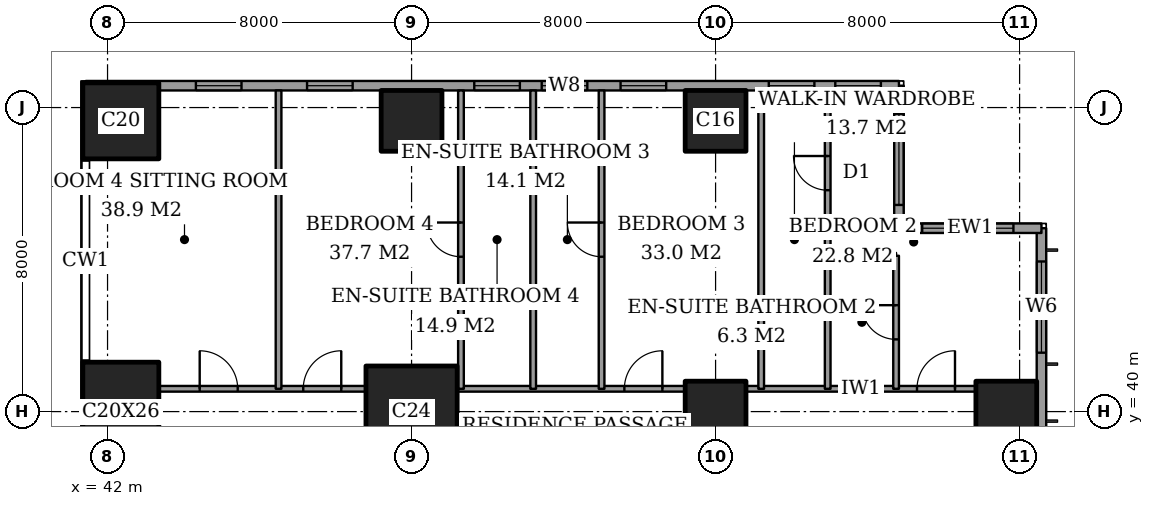
"""IFC4 building model, lengths in metres.
Left out: names, types, materials, properties, quantities, classifications, styles, units other than length and angle.
Written with IfcOpenShell. Run it as: python <this file> out.ifc"""

import sys

from ifc_helpers import new_model, si_unit, direction, frame, frame_2d, origin, origin_2d, place, context, subcontext, project, spatial, rectangle, extrude, element, fill, save


model = new_model("IFC4")
c1 = context("Model", 3, precision=1e-05, world=origin(), true_north=direction((0.0, 1.0)))
c2 = subcontext(c1, "Body", "Model", "MODEL_VIEW")
j1 = project(units=[si_unit("LENGTHUNIT", "METRE"), si_unit("PLANEANGLEUNIT", "RADIAN")], contexts=[c1])
p1 = place(None, origin())
s1 = spatial("IfcSite", under=j1, at=p1, CompositionType="ELEMENT")
p2 = place(p1, origin())
s2 = spatial("IfcBuilding", under=s1, at=p2, CompositionType="ELEMENT")
p3 = place(p2, frame((0.0, 0.0, 270.0)))
s3 = spatial("IfcBuildingStorey", under=s2, at=p3, CompositionType="ELEMENT", Elevation=270.0)
p4 = place(p3, frame((42.35, 40.0, 0.0), z_axis=(0.0, 0.0, 1.0), x_axis=(1.0, 0.0, 0.0)))
e1 = element("IfcColumn", 1, at=p4, inside=s3, PredefinedType="COLUMN", context=c2, shape_type="SweptSolid", body=[
    extrude(rectangle(XDim=2.0, YDim=2.6, at=origin_2d()), origin(), (0.0, 0.0, 1.0), 3.6),
])
p5 = place(p3, frame((42.35, 47.65, 0.0), z_axis=(0.0, 0.0, 1.0), x_axis=(1.0, 0.0, 0.0)))
e2 = element("IfcColumn", 2, at=p5, inside=s3, PredefinedType="COLUMN", context=c2, shape_type="SweptSolid", body=[
    extrude(rectangle(XDim=2.0, YDim=2.0, at=origin_2d()), origin(), (0.0, 0.0, 1.0), 3.6),
])
p6 = place(p3, frame((50.0, 40.0, 0.0), z_axis=(0.0, 0.0, 1.0), x_axis=(1.0, 0.0, 0.0)))
e3 = element("IfcColumn", 3, at=p6, inside=s3, PredefinedType="COLUMN", context=c2, shape_type="SweptSolid", body=[
    extrude(rectangle(XDim=2.4, YDim=2.4, at=origin_2d()), origin(), (0.0, 0.0, 1.0), 3.6),
])
for number, where, z_axis, x_axis in (
    (4, (50.0, 47.65, 0.0), (0.0, 0.0, 1.0), (1.0, 0.0, 0.0)),
    (5, (58.0, 40.0, 0.0), (0.0, 0.0, 1.0), (1.0, 0.0, 0.0)),
    (6, (58.0, 47.65, 0.0), (0.0, 0.0, 1.0), (1.0, 0.0, 0.0)),
    (7, (65.65, 40.0, 0.0), (0.0, 0.0, 1.0), (1.0, 0.0, 0.0)),
):
    element("IfcColumn", number, at=place(p3, frame(where, z_axis=z_axis, x_axis=x_axis)), inside=s3, PredefinedType="COLUMN", context=c2, shape_type="SweptSolid", body=[
        extrude(rectangle(XDim=1.6, YDim=1.6, at=origin_2d()), origin(), (0.0, 0.0, 1.0), 3.6),
    ])
p7 = place(p3, frame((66.575, 3.175, 0.0), z_axis=(0.0, 0.0, 1.0), x_axis=(0.0, 1.0, 0.0)))
e8 = element("IfcWall", 8, at=p7, inside=s3, PredefinedType="SOLIDWALL", context=c2, shape_type="SweptSolid", body=[
    extrude(rectangle(XDim=41.65, YDim=0.25, at=frame_2d((20.825, 0.0))), origin(), (0.0, 0.0, 1.0), 3.6),
])
p8 = place(p7, frame((0.875, 0.0, 0.6)))
e9 = element("IfcOpeningElement", 9, at=p8, cuts=e8, PredefinedType="OPENING", context=c2, shape_type="SweptSolid", body=[
    extrude(rectangle(XDim=2.4, YDim=2.0, at=frame_2d((1.2, 1.0))), frame((0.0, 0.135, 0.0), z_axis=(0.0, -1.0, 0.0), x_axis=(1.0, 0.0, 0.0)), (0.0, 0.0, 1.0), 0.27),
])
p9 = place(p7, frame((6.0, 0.0, 0.6)))
e10 = element("IfcOpeningElement", 10, at=p9, cuts=e8, PredefinedType="OPENING", context=c2, shape_type="SweptSolid", body=[
    extrude(rectangle(XDim=1.2, YDim=2.0, at=frame_2d((0.6, 1.0))), frame((0.0, 0.135, 0.0), z_axis=(0.0, -1.0, 0.0), x_axis=(1.0, 0.0, 0.0)), (0.0, 0.0, 1.0), 0.27),
])
p10 = place(p7, frame((8.525, 0.0, 0.6)))
e11 = element("IfcOpeningElement", 11, at=p10, cuts=e8, PredefinedType="OPENING", context=c2, shape_type="SweptSolid", body=[
    extrude(rectangle(XDim=2.4, YDim=2.0, at=frame_2d((1.2, 1.0))), frame((0.0, 0.135, 0.0), z_axis=(0.0, -1.0, 0.0), x_axis=(1.0, 0.0, 0.0)), (0.0, 0.0, 1.0), 0.27),
])
p11 = place(p7, frame((15.725, 0.0, 0.6)))
e12 = element("IfcOpeningElement", 12, at=p11, cuts=e8, PredefinedType="OPENING", context=c2, shape_type="SweptSolid", body=[
    extrude(rectangle(XDim=2.4, YDim=2.0, at=frame_2d((1.2, 1.0))), frame((0.0, 0.135, 0.0), z_axis=(0.0, -1.0, 0.0), x_axis=(1.0, 0.0, 0.0)), (0.0, 0.0, 1.0), 0.27),
])
p12 = place(p7, frame((23.625, 0.0, 0.6)))
e13 = element("IfcOpeningElement", 13, at=p12, cuts=e8, PredefinedType="OPENING", context=c2, shape_type="SweptSolid", body=[
    extrude(rectangle(XDim=2.4, YDim=2.0, at=frame_2d((1.2, 1.0))), frame((0.0, 0.135, 0.0), z_axis=(0.0, -1.0, 0.0), x_axis=(1.0, 0.0, 0.0)), (0.0, 0.0, 1.0), 0.27),
])
p13 = place(p7, frame((30.725, 0.0, 0.6)))
e14 = element("IfcOpeningElement", 14, at=p13, cuts=e8, PredefinedType="OPENING", context=c2, shape_type="SweptSolid", body=[
    extrude(rectangle(XDim=2.4, YDim=2.0, at=frame_2d((1.2, 1.0))), frame((0.0, 0.135, 0.0), z_axis=(0.0, -1.0, 0.0), x_axis=(1.0, 0.0, 0.0)), (0.0, 0.0, 1.0), 0.27),
])
p14 = place(p7, frame((34.525, 0.0, 0.6)))
e15 = element("IfcOpeningElement", 15, at=p14, cuts=e8, PredefinedType="OPENING", context=c2, shape_type="SweptSolid", body=[
    extrude(rectangle(XDim=1.2, YDim=2.0, at=frame_2d((0.6, 1.0))), frame((0.0, 0.135, 0.0), z_axis=(0.0, -1.0, 0.0), x_axis=(1.0, 0.0, 0.0)), (0.0, 0.0, 1.0), 0.27),
])
p15 = place(p7, frame((38.375, 0.0, 0.6)))
e16 = element("IfcOpeningElement", 16, at=p15, cuts=e8, PredefinedType="OPENING", context=c2, shape_type="SweptSolid", body=[
    extrude(rectangle(XDim=2.4, YDim=2.0, at=frame_2d((1.2, 1.0))), frame((0.0, 0.135, 0.0), z_axis=(0.0, -1.0, 0.0), x_axis=(1.0, 0.0, 0.0)), (0.0, 0.0, 1.0), 0.27),
])
p16 = place(p3, frame((66.575, 44.825, 0.0), z_axis=(0.0, 0.0, 1.0), x_axis=(-1.0, 0.0, 0.0)))
e17 = element("IfcWall", 17, at=p16, inside=s3, PredefinedType="SOLIDWALL", context=c2, shape_type="SweptSolid", body=[
    extrude(rectangle(XDim=3.75, YDim=0.25, at=frame_2d((1.875, 0.0))), origin(), (0.0, 0.0, 1.0), 3.6),
])
p17 = place(p16, frame((0.738, 0.0, 0.6)))
e18 = element("IfcOpeningElement", 18, at=p17, cuts=e17, PredefinedType="OPENING", context=c2, shape_type="SweptSolid", body=[
    extrude(rectangle(XDim=2.4, YDim=2.0, at=frame_2d((1.2, 1.0))), frame((0.0, 0.135, 0.0), z_axis=(0.0, -1.0, 0.0), x_axis=(1.0, 0.0, 0.0)), (0.0, 0.0, 1.0), 0.27),
])
p18 = place(p3, frame((62.825, 44.825, 0.0), z_axis=(0.0, 0.0, 1.0), x_axis=(0.0, 1.0, 0.0)))
e19 = element("IfcWall", 19, at=p18, inside=s3, PredefinedType="SOLIDWALL", context=c2, shape_type="SweptSolid", body=[
    extrude(rectangle(XDim=3.75, YDim=0.25, at=frame_2d((1.875, 0.0))), origin(), (0.0, 0.0, 1.0), 3.6),
])
p19 = place(p18, frame((0.613, 0.0, 0.6)))
e20 = element("IfcOpeningElement", 20, at=p19, cuts=e19, PredefinedType="OPENING", context=c2, shape_type="SweptSolid", body=[
    extrude(rectangle(XDim=2.4, YDim=2.0, at=frame_2d((1.2, 1.0))), frame((0.0, 0.135, 0.0), z_axis=(0.0, -1.0, 0.0), x_axis=(1.0, 0.0, 0.0)), (0.0, 0.0, 1.0), 0.27),
])
p20 = place(p3, frame((62.825, 48.575, 0.0), z_axis=(0.0, 0.0, 1.0), x_axis=(-1.0, 0.0, 0.0)))
e21 = element("IfcWall", 21, at=p20, inside=s3, PredefinedType="SOLIDWALL", context=c2, shape_type="SweptSolid", body=[
    extrude(rectangle(XDim=21.4, YDim=0.25, at=frame_2d((10.7, 0.0))), origin(), (0.0, 0.0, 1.0), 3.6),
])
p21 = place(p20, frame((0.475, 0.0, 0.6)))
e22 = element("IfcOpeningElement", 22, at=p21, cuts=e21, PredefinedType="OPENING", context=c2, shape_type="SweptSolid", body=[
    extrude(rectangle(XDim=1.2, YDim=2.0, at=frame_2d((0.6, 1.0))), frame((0.0, 0.135, 0.0), z_axis=(0.0, -1.0, 0.0), x_axis=(1.0, 0.0, 0.0)), (0.0, 0.0, 1.0), 0.27),
])
p22 = place(p20, frame((2.225, 0.0, 0.6)))
e23 = element("IfcOpeningElement", 23, at=p22, cuts=e21, PredefinedType="OPENING", context=c2, shape_type="SweptSolid", body=[
    extrude(rectangle(XDim=1.2, YDim=2.0, at=frame_2d((0.6, 1.0))), frame((0.0, 0.135, 0.0), z_axis=(0.0, -1.0, 0.0), x_axis=(1.0, 0.0, 0.0)), (0.0, 0.0, 1.0), 0.27),
])
p23 = place(p20, frame((6.125, 0.0, 0.6)))
e24 = element("IfcOpeningElement", 24, at=p23, cuts=e21, PredefinedType="OPENING", context=c2, shape_type="SweptSolid", body=[
    extrude(rectangle(XDim=1.2, YDim=2.0, at=frame_2d((0.6, 1.0))), frame((0.0, 0.135, 0.0), z_axis=(0.0, -1.0, 0.0), x_axis=(1.0, 0.0, 0.0)), (0.0, 0.0, 1.0), 0.27),
])
p24 = place(p20, frame((8.2, 0.0, 0.6)))
e25 = element("IfcOpeningElement", 25, at=p24, cuts=e21, PredefinedType="OPENING", context=c2, shape_type="SweptSolid", body=[
    extrude(rectangle(XDim=1.2, YDim=2.0, at=frame_2d((0.6, 1.0))), frame((0.0, 0.135, 0.0), z_axis=(0.0, -1.0, 0.0), x_axis=(1.0, 0.0, 0.0)), (0.0, 0.0, 1.0), 0.27),
])
p25 = place(p20, frame((9.975, 0.0, 0.6)))
e26 = element("IfcOpeningElement", 26, at=p25, cuts=e21, PredefinedType="OPENING", context=c2, shape_type="SweptSolid", body=[
    extrude(rectangle(XDim=1.2, YDim=2.0, at=frame_2d((0.6, 1.0))), frame((0.0, 0.135, 0.0), z_axis=(0.0, -1.0, 0.0), x_axis=(1.0, 0.0, 0.0)), (0.0, 0.0, 1.0), 0.27),
])
p26 = place(p20, frame((14.375, 0.0, 0.6)))
e27 = element("IfcOpeningElement", 27, at=p26, cuts=e21, PredefinedType="OPENING", context=c2, shape_type="SweptSolid", body=[
    extrude(rectangle(XDim=1.2, YDim=2.0, at=frame_2d((0.6, 1.0))), frame((0.0, 0.135, 0.0), z_axis=(0.0, -1.0, 0.0), x_axis=(1.0, 0.0, 0.0)), (0.0, 0.0, 1.0), 0.27),
])
p27 = place(p20, frame((17.3, 0.0, 0.6)))
e28 = element("IfcOpeningElement", 28, at=p27, cuts=e21, PredefinedType="OPENING", context=c2, shape_type="SweptSolid", body=[
    extrude(rectangle(XDim=1.2, YDim=2.0, at=frame_2d((0.6, 1.0))), frame((0.0, 0.135, 0.0), z_axis=(0.0, -1.0, 0.0), x_axis=(1.0, 0.0, 0.0)), (0.0, 0.0, 1.0), 0.27),
])
p28 = place(p3, frame((43.35, 40.6, 0.0), z_axis=(0.0, 0.0, 1.0), x_axis=(1.0, 0.0, 0.0)))
e29 = element("IfcWall", 29, at=p28, inside=s3, PredefinedType="PARTITIONING", context=c2, shape_type="SweptSolid", body=[
    extrude(rectangle(XDim=5.45, YDim=0.15, at=frame_2d((2.725, 0.0))), origin(), (0.0, 0.0, 1.0), 3.35),
])
p29 = place(p28, frame((3.8, 0.0, 0.0)))
e30 = element("IfcOpeningElement", 30, at=p29, cuts=e29, PredefinedType="OPENING", context=c2, shape_type="SweptSolid", body=[
    extrude(rectangle(XDim=1.0, YDim=2.1, at=frame_2d((0.5, 1.05))), frame((0.0, 0.085, 0.0), z_axis=(0.0, -1.0, 0.0), x_axis=(1.0, 0.0, 0.0)), (0.0, 0.0, 1.0), 0.17),
])
p30 = place(p28, frame((1.075, 0.0, 0.0)))
e31 = element("IfcOpeningElement", 31, at=p30, cuts=e29, PredefinedType="OPENING", context=c2, shape_type="SweptSolid", body=[
    extrude(rectangle(XDim=1.0, YDim=2.1, at=frame_2d((0.5, 1.05))), frame((0.0, 0.085, 0.0), z_axis=(0.0, -1.0, 0.0), x_axis=(1.0, 0.0, 0.0)), (0.0, 0.0, 1.0), 0.17),
])
p31 = place(p3, frame((51.2, 40.6, 0.0), z_axis=(0.0, 0.0, 1.0), x_axis=(1.0, 0.0, 0.0)))
e32 = element("IfcWall", 32, at=p31, inside=s3, PredefinedType="PARTITIONING", context=c2, shape_type="SweptSolid", body=[
    extrude(rectangle(XDim=6.0, YDim=0.15, at=frame_2d((3.0, 0.0))), origin(), (0.0, 0.0, 1.0), 3.35),
])
p32 = place(p31, frame((4.4, 0.0, 0.0)))
e33 = element("IfcOpeningElement", 33, at=p32, cuts=e32, PredefinedType="OPENING", context=c2, shape_type="SweptSolid", body=[
    extrude(rectangle(XDim=1.0, YDim=2.1, at=frame_2d((0.5, 1.05))), frame((0.0, 0.085, 0.0), z_axis=(0.0, -1.0, 0.0), x_axis=(1.0, 0.0, 0.0)), (0.0, 0.0, 1.0), 0.17),
])
p33 = place(p3, frame((58.8, 40.6, 0.0), z_axis=(0.0, 0.0, 1.0), x_axis=(1.0, 0.0, 0.0)))
e34 = element("IfcWall", 34, at=p33, inside=s3, PredefinedType="PARTITIONING", context=c2, shape_type="SweptSolid", body=[
    extrude(rectangle(XDim=6.05, YDim=0.15, at=frame_2d((3.025, 0.0))), origin(), (0.0, 0.0, 1.0), 3.35),
])
p34 = place(p33, frame((4.5, 0.0, 0.0)))
e35 = element("IfcOpeningElement", 35, at=p34, cuts=e34, PredefinedType="OPENING", context=c2, shape_type="SweptSolid", body=[
    extrude(rectangle(XDim=1.0, YDim=2.1, at=frame_2d((0.5, 1.05))), frame((0.0, 0.085, 0.0), z_axis=(0.0, -1.0, 0.0), x_axis=(1.0, 0.0, 0.0)), (0.0, 0.0, 1.0), 0.17),
])
p35 = place(p3, frame((60.95, 44.1, 0.0), z_axis=(0.0, 0.0, 1.0), x_axis=(1.0, 0.0, 0.0)))
e36 = element("IfcWall", 36, at=p35, inside=s3, PredefinedType="PARTITIONING", context=c2, shape_type="SweptSolid", body=[
    extrude(rectangle(XDim=1.8, YDim=0.15, at=frame_2d((0.9, 0.0))), origin(), (0.0, 0.0, 1.0), 3.35),
])
p36 = place(p3, frame((46.5, 40.6, 0.0), z_axis=(0.0, 0.0, 1.0), x_axis=(0.0, 1.0, 0.0)))
e37 = element("IfcWall", 37, at=p36, inside=s3, PredefinedType="PARTITIONING", context=c2, shape_type="SweptSolid", body=[
    extrude(rectangle(XDim=7.85, YDim=0.15, at=frame_2d((3.925, 0.0))), origin(), (0.0, 0.0, 1.0), 3.35),
])
p37 = place(p3, frame((51.3, 40.6, 0.0), z_axis=(0.0, 0.0, 1.0), x_axis=(0.0, 1.0, 0.0)))
e38 = element("IfcWall", 38, at=p37, inside=s3, PredefinedType="PARTITIONING", context=c2, shape_type="SweptSolid", body=[
    extrude(rectangle(XDim=7.85, YDim=0.15, at=frame_2d((3.925, 0.0))), origin(), (0.0, 0.0, 1.0), 3.35),
])
p38 = place(p37, frame((3.475, 0.0, 0.0)))
e39 = element("IfcOpeningElement", 39, at=p38, cuts=e38, PredefinedType="OPENING", context=c2, shape_type="SweptSolid", body=[
    extrude(rectangle(XDim=0.9, YDim=2.1, at=frame_2d((0.45, 1.05))), frame((0.0, 0.085, 0.0), z_axis=(0.0, -1.0, 0.0), x_axis=(1.0, 0.0, 0.0)), (0.0, 0.0, 1.0), 0.17),
])
p39 = place(p3, frame((53.2, 40.6, 0.0), z_axis=(0.0, 0.0, 1.0), x_axis=(0.0, 1.0, 0.0)))
e40 = element("IfcWall", 40, at=p39, inside=s3, PredefinedType="PARTITIONING", context=c2, shape_type="SweptSolid", body=[
    extrude(rectangle(XDim=7.85, YDim=0.15, at=frame_2d((3.925, 0.0))), origin(), (0.0, 0.0, 1.0), 3.35),
])
p40 = place(p3, frame((55.0, 40.6, 0.0), z_axis=(0.0, 0.0, 1.0), x_axis=(0.0, 1.0, 0.0)))
e41 = element("IfcWall", 41, at=p40, inside=s3, PredefinedType="PARTITIONING", context=c2, shape_type="SweptSolid", body=[
    extrude(rectangle(XDim=7.85, YDim=0.15, at=frame_2d((3.925, 0.0))), origin(), (0.0, 0.0, 1.0), 3.35),
])
p41 = place(p40, frame((3.475, 0.0, 0.0)))
e42 = element("IfcOpeningElement", 42, at=p41, cuts=e41, PredefinedType="OPENING", context=c2, shape_type="SweptSolid", body=[
    extrude(rectangle(XDim=0.9, YDim=2.1, at=frame_2d((0.45, 1.05))), frame((0.0, 0.085, 0.0), z_axis=(0.0, -1.0, 0.0), x_axis=(1.0, 0.0, 0.0)), (0.0, 0.0, 1.0), 0.17),
])
p42 = place(p3, frame((59.2, 40.6, 0.0), z_axis=(0.0, 0.0, 1.0), x_axis=(0.0, 1.0, 0.0)))
e43 = element("IfcWall", 43, at=p42, inside=s3, PredefinedType="PARTITIONING", context=c2, shape_type="SweptSolid", body=[
    extrude(rectangle(XDim=7.85, YDim=0.15, at=frame_2d((3.925, 0.0))), origin(), (0.0, 0.0, 1.0), 3.35),
])
p43 = place(p3, frame((60.95, 40.6, 0.0), z_axis=(0.0, 0.0, 1.0), x_axis=(0.0, 1.0, 0.0)))
e44 = element("IfcWall", 44, at=p43, inside=s3, PredefinedType="PARTITIONING", context=c2, shape_type="SweptSolid", body=[
    extrude(rectangle(XDim=7.85, YDim=0.15, at=frame_2d((3.925, 0.0))), origin(), (0.0, 0.0, 1.0), 3.35),
])
p44 = place(p43, frame((5.225, 0.0, 0.0)))
e45 = element("IfcOpeningElement", 45, at=p44, cuts=e44, PredefinedType="OPENING", context=c2, shape_type="SweptSolid", body=[
    extrude(rectangle(XDim=0.9, YDim=2.1, at=frame_2d((0.45, 1.05))), frame((0.0, 0.085, 0.0), z_axis=(0.0, -1.0, 0.0), x_axis=(1.0, 0.0, 0.0)), (0.0, 0.0, 1.0), 0.17),
])
p45 = place(p3, frame((62.75, 40.6, 0.0), z_axis=(0.0, 0.0, 1.0), x_axis=(0.0, 1.0, 0.0)))
e46 = element("IfcWall", 46, at=p45, inside=s3, PredefinedType="PARTITIONING", context=c2, shape_type="SweptSolid", body=[
    extrude(rectangle(XDim=3.5, YDim=0.15, at=frame_2d((1.75, 0.0))), origin(), (0.0, 0.0, 1.0), 3.35),
])
p46 = place(p45, frame((1.3, 0.0, 0.0)))
e47 = element("IfcOpeningElement", 47, at=p46, cuts=e46, PredefinedType="OPENING", context=c2, shape_type="SweptSolid", body=[
    extrude(rectangle(XDim=0.9, YDim=2.1, at=frame_2d((0.45, 1.05))), frame((0.0, 0.085, 0.0), z_axis=(0.0, -1.0, 0.0), x_axis=(1.0, 0.0, 0.0)), (0.0, 0.0, 1.0), 0.17),
])
p47 = place(p15, origin())
e48 = element("IfcWindow", 48, at=p47, inside=s3, PartitioningType="SINGLE_PANEL", PredefinedType="WINDOW", context=c2, shape_type="SweptSolid", body=[
    extrude(rectangle(XDim=2.4, YDim=2.0, at=frame_2d((1.2, 1.0))), frame((0.0, 0.03, 0.0), z_axis=(0.0, -1.0, 0.0), x_axis=(1.0, 0.0, 0.0)), (0.0, 0.0, 1.0), 0.06),
])
fill(e16, e48)
p48 = place(p17, origin())
e49 = element("IfcWindow", 49, at=p48, inside=s3, PartitioningType="SINGLE_PANEL", PredefinedType="WINDOW", context=c2, shape_type="SweptSolid", body=[
    extrude(rectangle(XDim=2.4, YDim=2.0, at=frame_2d((1.2, 1.0))), frame((0.0, 0.03, 0.0), z_axis=(0.0, -1.0, 0.0), x_axis=(1.0, 0.0, 0.0)), (0.0, 0.0, 1.0), 0.06),
])
fill(e18, e49)
p49 = place(p19, origin())
e50 = element("IfcWindow", 50, at=p49, inside=s3, PartitioningType="SINGLE_PANEL", PredefinedType="WINDOW", context=c2, shape_type="SweptSolid", body=[
    extrude(rectangle(XDim=2.4, YDim=2.0, at=frame_2d((1.2, 1.0))), frame((0.0, 0.03, 0.0), z_axis=(0.0, -1.0, 0.0), x_axis=(1.0, 0.0, 0.0)), (0.0, 0.0, 1.0), 0.06),
])
fill(e20, e50)
p50 = place(p21, origin())
e51 = element("IfcWindow", 51, at=p50, inside=s3, PartitioningType="SINGLE_PANEL", PredefinedType="WINDOW", context=c2, shape_type="SweptSolid", body=[
    extrude(rectangle(XDim=1.2, YDim=2.0, at=frame_2d((0.6, 1.0))), frame((0.0, 0.03, 0.0), z_axis=(0.0, -1.0, 0.0), x_axis=(1.0, 0.0, 0.0)), (0.0, 0.0, 1.0), 0.06),
])
fill(e22, e51)
p51 = place(p22, origin())
e52 = element("IfcWindow", 52, at=p51, inside=s3, PartitioningType="SINGLE_PANEL", PredefinedType="WINDOW", context=c2, shape_type="SweptSolid", body=[
    extrude(rectangle(XDim=1.2, YDim=2.0, at=frame_2d((0.6, 1.0))), frame((0.0, 0.03, 0.0), z_axis=(0.0, -1.0, 0.0), x_axis=(1.0, 0.0, 0.0)), (0.0, 0.0, 1.0), 0.06),
])
fill(e23, e52)
p52 = place(p23, origin())
e53 = element("IfcWindow", 53, at=p52, inside=s3, PartitioningType="SINGLE_PANEL", PredefinedType="WINDOW", context=c2, shape_type="SweptSolid", body=[
    extrude(rectangle(XDim=1.2, YDim=2.0, at=frame_2d((0.6, 1.0))), frame((0.0, 0.03, 0.0), z_axis=(0.0, -1.0, 0.0), x_axis=(1.0, 0.0, 0.0)), (0.0, 0.0, 1.0), 0.06),
])
fill(e24, e53)
p53 = place(p24, origin())
e54 = element("IfcWindow", 54, at=p53, inside=s3, PartitioningType="SINGLE_PANEL", PredefinedType="WINDOW", context=c2, shape_type="SweptSolid", body=[
    extrude(rectangle(XDim=1.2, YDim=2.0, at=frame_2d((0.6, 1.0))), frame((0.0, 0.03, 0.0), z_axis=(0.0, -1.0, 0.0), x_axis=(1.0, 0.0, 0.0)), (0.0, 0.0, 1.0), 0.06),
])
fill(e25, e54)
p54 = place(p25, origin())
e55 = element("IfcWindow", 55, at=p54, inside=s3, PartitioningType="SINGLE_PANEL", PredefinedType="WINDOW", context=c2, shape_type="SweptSolid", body=[
    extrude(rectangle(XDim=1.2, YDim=2.0, at=frame_2d((0.6, 1.0))), frame((0.0, 0.03, 0.0), z_axis=(0.0, -1.0, 0.0), x_axis=(1.0, 0.0, 0.0)), (0.0, 0.0, 1.0), 0.06),
])
fill(e26, e55)
p55 = place(p26, origin())
e56 = element("IfcWindow", 56, at=p55, inside=s3, PartitioningType="SINGLE_PANEL", PredefinedType="WINDOW", context=c2, shape_type="SweptSolid", body=[
    extrude(rectangle(XDim=1.2, YDim=2.0, at=frame_2d((0.6, 1.0))), frame((0.0, 0.03, 0.0), z_axis=(0.0, -1.0, 0.0), x_axis=(1.0, 0.0, 0.0)), (0.0, 0.0, 1.0), 0.06),
])
fill(e27, e56)
p56 = place(p27, origin())
e57 = element("IfcWindow", 57, at=p56, inside=s3, PartitioningType="SINGLE_PANEL", PredefinedType="WINDOW", context=c2, shape_type="SweptSolid", body=[
    extrude(rectangle(XDim=1.2, YDim=2.0, at=frame_2d((0.6, 1.0))), frame((0.0, 0.03, 0.0), z_axis=(0.0, -1.0, 0.0), x_axis=(1.0, 0.0, 0.0)), (0.0, 0.0, 1.0), 0.06),
])
fill(e28, e57)
p57 = place(p46, origin())
e58 = element("IfcDoor", 58, at=p57, inside=s3, OperationType="SINGLE_SWING_LEFT", PredefinedType="DOOR", context=c2, shape_type="SweptSolid", body=[
    extrude(rectangle(XDim=0.9, YDim=2.1, at=frame_2d((0.45, 1.05))), frame((0.0, 0.025, 0.0), z_axis=(0.0, -1.0, 0.0), x_axis=(1.0, 0.0, 0.0)), (0.0, 0.0, 1.0), 0.05),
])
fill(e47, e58)
p58 = place(p34, origin())
e59 = element("IfcDoor", 59, at=p58, inside=s3, OperationType="SINGLE_SWING_LEFT", PredefinedType="DOOR", context=c2, shape_type="SweptSolid", body=[
    extrude(rectangle(XDim=1.0, YDim=2.1, at=frame_2d((0.5, 1.05))), frame((0.0, 0.025, 0.0), z_axis=(0.0, -1.0, 0.0), x_axis=(1.0, 0.0, 0.0)), (0.0, 0.0, 1.0), 0.05),
])
fill(e35, e59)
p59 = place(p44, origin())
e60 = element("IfcDoor", 60, at=p59, inside=s3, OperationType="SINGLE_SWING_LEFT", PredefinedType="DOOR", context=c2, shape_type="SweptSolid", body=[
    extrude(rectangle(XDim=0.9, YDim=2.1, at=frame_2d((0.45, 1.05))), frame((0.0, 0.025, 0.0), z_axis=(0.0, -1.0, 0.0), x_axis=(1.0, 0.0, 0.0)), (0.0, 0.0, 1.0), 0.05),
])
fill(e45, e60)
p60 = place(p32, origin())
e61 = element("IfcDoor", 61, at=p60, inside=s3, OperationType="SINGLE_SWING_LEFT", PredefinedType="DOOR", context=c2, shape_type="SweptSolid", body=[
    extrude(rectangle(XDim=1.0, YDim=2.1, at=frame_2d((0.5, 1.05))), frame((0.0, 0.025, 0.0), z_axis=(0.0, -1.0, 0.0), x_axis=(1.0, 0.0, 0.0)), (0.0, 0.0, 1.0), 0.05),
])
fill(e33, e61)
p61 = place(p41, origin())
e62 = element("IfcDoor", 62, at=p61, inside=s3, OperationType="SINGLE_SWING_LEFT", PredefinedType="DOOR", context=c2, shape_type="SweptSolid", body=[
    extrude(rectangle(XDim=0.9, YDim=2.1, at=frame_2d((0.45, 1.05))), frame((0.0, 0.025, 0.0), z_axis=(0.0, -1.0, 0.0), x_axis=(1.0, 0.0, 0.0)), (0.0, 0.0, 1.0), 0.05),
])
fill(e42, e62)
p62 = place(p38, origin())
e63 = element("IfcDoor", 63, at=p62, inside=s3, OperationType="SINGLE_SWING_LEFT", PredefinedType="DOOR", context=c2, shape_type="SweptSolid", body=[
    extrude(rectangle(XDim=0.9, YDim=2.1, at=frame_2d((0.45, 1.05))), frame((0.0, 0.025, 0.0), z_axis=(0.0, -1.0, 0.0), x_axis=(1.0, 0.0, 0.0)), (0.0, 0.0, 1.0), 0.05),
])
fill(e39, e63)
p63 = place(p29, origin())
e64 = element("IfcDoor", 64, at=p63, inside=s3, OperationType="SINGLE_SWING_LEFT", PredefinedType="DOOR", context=c2, shape_type="SweptSolid", body=[
    extrude(rectangle(XDim=1.0, YDim=2.1, at=frame_2d((0.5, 1.05))), frame((0.0, 0.025, 0.0), z_axis=(0.0, -1.0, 0.0), x_axis=(1.0, 0.0, 0.0)), (0.0, 0.0, 1.0), 0.05),
])
fill(e30, e64)
p64 = place(p30, origin())
e65 = element("IfcDoor", 65, at=p64, inside=s3, OperationType="SINGLE_SWING_RIGHT", PredefinedType="DOOR", context=c2, shape_type="SweptSolid", body=[
    extrude(rectangle(XDim=1.0, YDim=2.1, at=frame_2d((0.5, 1.05))), frame((0.0, 0.025, 0.0), z_axis=(0.0, -1.0, 0.0), x_axis=(1.0, 0.0, 0.0)), (0.0, 0.0, 1.0), 0.05),
])
fill(e31, e65)
save(model, sys.argv[1])
